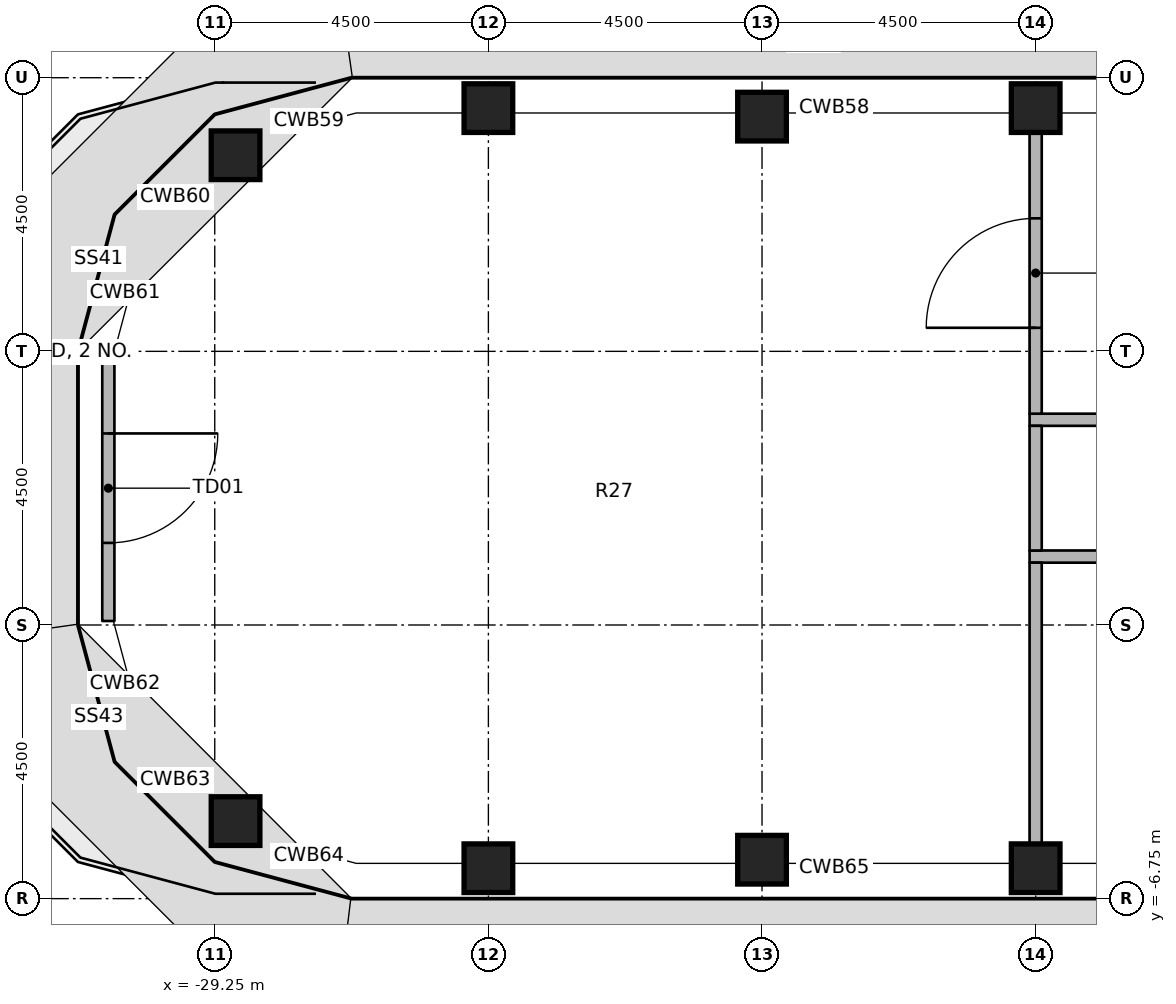
"""IFC4 building model, lengths in metres.
Left out: names, types, materials, properties, quantities, classifications, styles, units other than length and angle.
Written with IfcOpenShell. Run it as: python <this file> out.ifc"""

import sys

from ifc_helpers import new_model, si_unit, direction, frame, frame_2d, origin, origin_2d, place, context, subcontext, project, spatial, rectangle, extrude, element, fill, save


model = new_model("IFC4")
c1 = context("Model", 3, precision=1e-05, world=origin(), true_north=direction((0.0, 1.0)))
c2 = subcontext(c1, "Body", "Model", "MODEL_VIEW")
j1 = project(units=[si_unit("LENGTHUNIT", "METRE"), si_unit("PLANEANGLEUNIT", "RADIAN")], contexts=[c1])
p1 = place(None, origin())
s1 = spatial("IfcSite", under=j1, at=p1, CompositionType="ELEMENT")
p2 = place(p1, origin())
s2 = spatial("IfcBuilding", under=s1, at=p2, CompositionType="ELEMENT")
p3 = place(p2, frame((0.0, 0.0, 186.6)))
s3 = spatial("IfcBuildingStorey", under=s2, at=p3, CompositionType="ELEMENT", Elevation=186.6)
for number, where, z_axis, x_axis in (
    (1, (-28.908, -5.475, 0.0), (0.0, 0.0, 1.0), (1.0, 0.0, 0.0)),
    (2, (-28.908, 5.475, 0.0), (0.0, 0.0, 1.0), (1.0, 0.0, 0.0)),
    (3, (-24.75, -6.25, 0.0), (0.0, 0.0, 1.0), (1.0, 0.0, 0.0)),
    (4, (-24.75, 6.25, 0.0), (0.0, 0.0, 1.0), (1.0, 0.0, 0.0)),
    (5, (-20.25, -6.11, 0.0), (0.0, 0.0, 1.0), (1.0, 0.0, 0.0)),
    (6, (-20.25, 6.11, 0.0), (0.0, 0.0, 1.0), (1.0, 0.0, 0.0)),
    (7, (-15.75, -6.25, 0.0), (0.0, 0.0, 1.0), (1.0, 0.0, 0.0)),
    (8, (-15.75, 6.25, 0.0), (0.0, 0.0, 1.0), (1.0, 0.0, 0.0)),
):
    element("IfcColumn", number, at=place(p3, frame(where, z_axis=z_axis, x_axis=x_axis)), inside=s3, PredefinedType="COLUMN", context=c2, shape_type="SweptSolid", body=[
        extrude(rectangle(XDim=0.8, YDim=0.8, at=origin_2d()), origin(), (0.0, 0.0, 1.0), 3.65),
    ])
p4 = place(p3, frame((-31.0, 2.184, 0.0), z_axis=(0.0, 0.0, 1.0), x_axis=(0.0, -1.0, 0.0)))
e9 = element("IfcWall", 9, at=p4, inside=s3, PredefinedType="SOLIDWALL", context=c2, shape_type="SweptSolid", body=[
    extrude(rectangle(XDim=4.368, YDim=0.2, at=frame_2d((2.184, 0.0))), origin(), (0.0, 0.0, 1.0), 2.75),
])
p5 = place(p4, frame((1.284, 0.0, 0.0)))
e10 = element("IfcOpeningElement", 10, at=p5, cuts=e9, PredefinedType="OPENING", context=c2, shape_type="SweptSolid", body=[
    extrude(rectangle(XDim=1.8, YDim=2.4, at=frame_2d((0.9, 1.2))), frame((0.0, 0.11, 0.0), z_axis=(0.0, -1.0, 0.0), x_axis=(1.0, 0.0, 0.0)), (0.0, 0.0, 1.0), 0.22),
])
p6 = place(p3, frame((-15.85, 1.125, 0.0), z_axis=(0.0, 0.0, 1.0), x_axis=(1.0, 0.0, 0.0)))
e11 = element("IfcWall", 11, at=p6, inside=s3, PredefinedType="PARTITIONING", context=c2, shape_type="SweptSolid", body=[
    extrude(rectangle(XDim=4.7, YDim=0.2, at=frame_2d((2.35, 0.0))), origin(), (0.0, 0.0, 1.0), 2.746),
])
p7 = place(p6, frame((1.85, 0.0, 0.0)))
e12 = element("IfcOpeningElement", 12, at=p7, cuts=e11, PredefinedType="OPENING", context=c2, shape_type="SweptSolid", body=[
    extrude(rectangle(XDim=1.0, YDim=2.1, at=frame_2d((0.5, 1.05))), frame((0.0, 0.11, 0.0), z_axis=(0.0, -1.0, 0.0), x_axis=(1.0, 0.0, 0.0)), (0.0, 0.0, 1.0), 0.22),
])
p8 = place(p3, frame((-11.15, -1.125, 0.0), z_axis=(0.0, 0.0, 1.0), x_axis=(-1.0, 0.0, 0.0)))
e13 = element("IfcWall", 13, at=p8, inside=s3, PredefinedType="PARTITIONING", context=c2, shape_type="SweptSolid", body=[
    extrude(rectangle(XDim=4.7, YDim=0.2, at=frame_2d((2.35, 0.0))), origin(), (0.0, 0.0, 1.0), 2.746),
])
p9 = place(p8, frame((1.85, 0.0, 0.0)))
e14 = element("IfcOpeningElement", 14, at=p9, cuts=e13, PredefinedType="OPENING", context=c2, shape_type="SweptSolid", body=[
    extrude(rectangle(XDim=1.0, YDim=2.1, at=frame_2d((0.5, 1.05))), frame((0.0, 0.11, 0.0), z_axis=(0.0, -1.0, 0.0), x_axis=(1.0, 0.0, 0.0)), (0.0, 0.0, 1.0), 0.22),
])
p10 = place(p3, frame((-15.75, -1.025, 0.0), z_axis=(0.0, 0.0, 1.0), x_axis=(0.0, 1.0, 0.0)))
e15 = element("IfcWall", 15, at=p10, inside=s3, PredefinedType="PARTITIONING", context=c2, shape_type="SweptSolid", body=[
    extrude(rectangle(XDim=2.05, YDim=0.2, at=frame_2d((1.025, 0.0))), origin(), (0.0, 0.0, 1.0), 2.746),
])
p11 = place(p3, frame((-15.75, 1.225, 0.0), z_axis=(0.0, 0.0, 1.0), x_axis=(0.0, 1.0, 0.0)))
e16 = element("IfcWall", 16, at=p11, inside=s3, PredefinedType="PARTITIONING", context=c2, shape_type="SweptSolid", body=[
    extrude(rectangle(XDim=4.625, YDim=0.2, at=frame_2d((2.312, 0.0))), origin(), (0.0, 0.0, 1.0), 2.746),
])
p12 = place(p11, frame((1.413, 0.0, 0.0)))
e17 = element("IfcOpeningElement", 17, at=p12, cuts=e16, PredefinedType="OPENING", context=c2, shape_type="SweptSolid", body=[
    extrude(rectangle(XDim=1.8, YDim=2.1, at=frame_2d((0.9, 1.05))), frame((0.0, 0.11, 0.0), z_axis=(0.0, -1.0, 0.0), x_axis=(1.0, 0.0, 0.0)), (0.0, 0.0, 1.0), 0.22),
])
p13 = place(p3, frame((-15.75, -5.85, 0.0), z_axis=(0.0, 0.0, 1.0), x_axis=(0.0, 1.0, 0.0)))
e18 = element("IfcWall", 18, at=p13, inside=s3, PredefinedType="PARTITIONING", context=c2, shape_type="SweptSolid", body=[
    extrude(rectangle(XDim=4.625, YDim=0.2, at=frame_2d((2.312, 0.0))), origin(), (0.0, 0.0, 1.0), 2.746),
])
p14 = place(p5, origin())
e19 = element("IfcDoor", 19, at=p14, inside=s3, OperationType="SINGLE_SWING_LEFT", PredefinedType="DOOR", context=c2, shape_type="SweptSolid", body=[
    extrude(rectangle(XDim=1.8, YDim=2.4, at=frame_2d((0.9, 1.2))), frame((0.0, 0.025, 0.0), z_axis=(0.0, -1.0, 0.0), x_axis=(1.0, 0.0, 0.0)), (0.0, 0.0, 1.0), 0.05),
])
fill(e10, e19)
p15 = place(p12, origin())
e20 = element("IfcDoor", 20, at=p15, inside=s3, OperationType="DOUBLE_DOOR_SINGLE_SWING", PredefinedType="DOOR", context=c2, shape_type="SweptSolid", body=[
    extrude(rectangle(XDim=1.8, YDim=2.1, at=frame_2d((0.9, 1.05))), frame((0.0, 0.025, 0.0), z_axis=(0.0, -1.0, 0.0), x_axis=(1.0, 0.0, 0.0)), (0.0, 0.0, 1.0), 0.05),
])
fill(e17, e20)
save(model, sys.argv[1])
